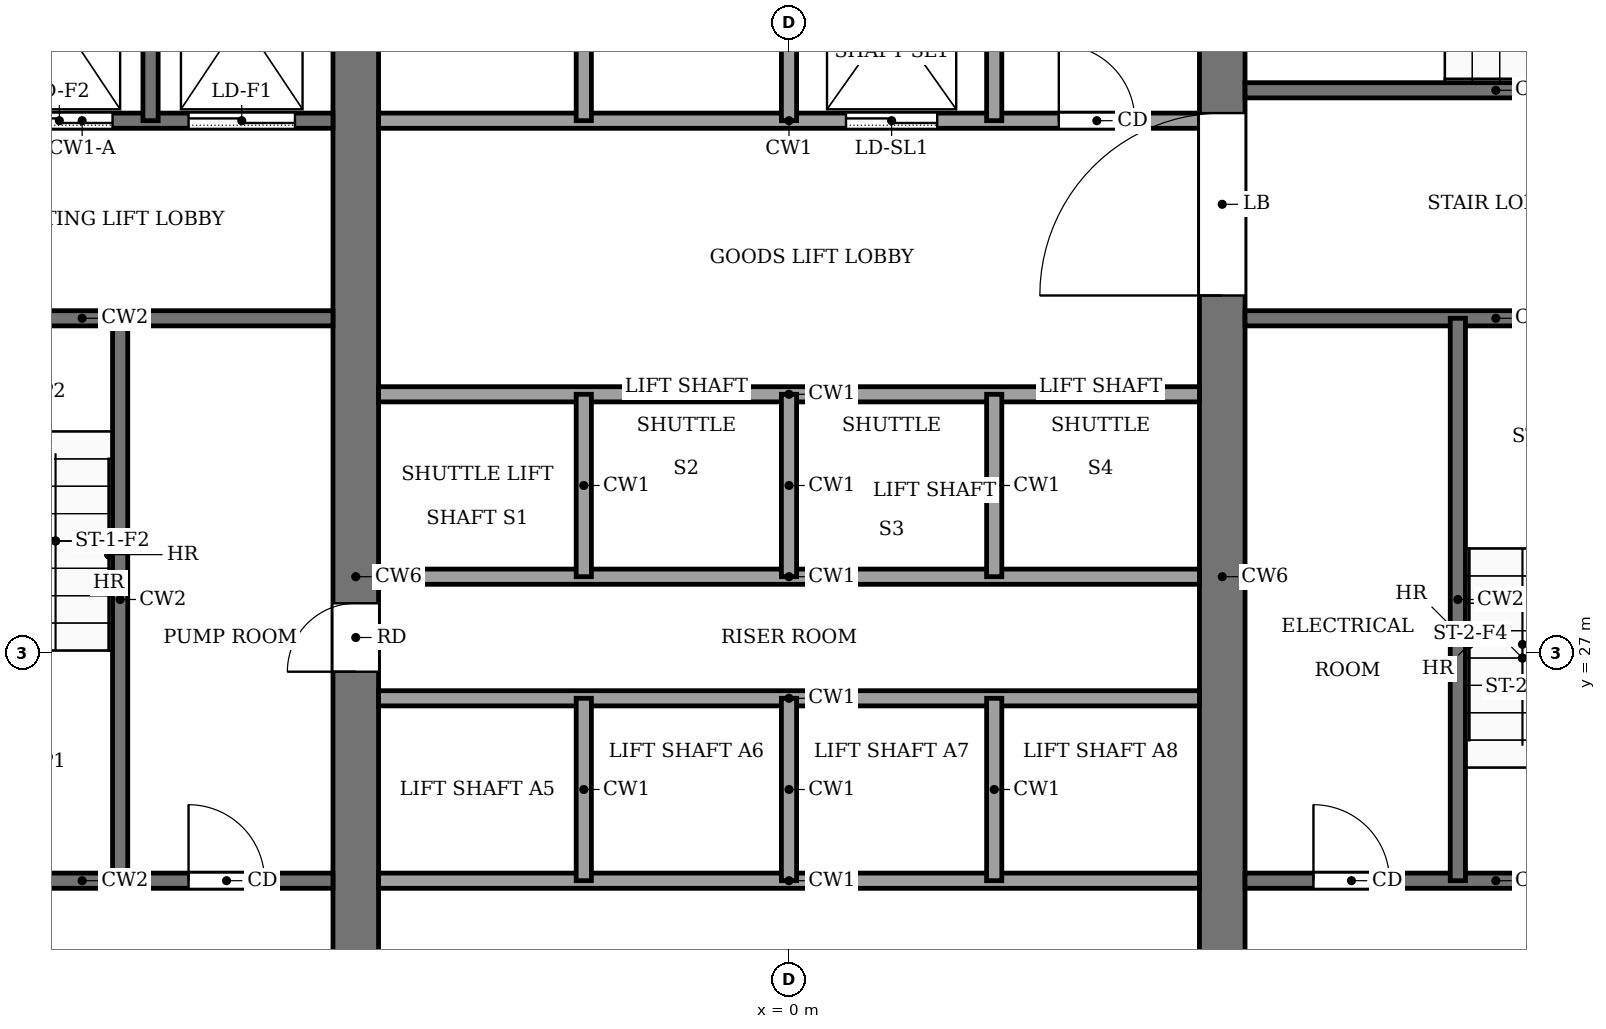
"""IFC4 building model, lengths in metres.
Left out: names, types, materials, properties, quantities, classifications, styles, units other than length and angle.
Written with IfcOpenShell. Run it as: python <this file> out.ifc"""

import sys

from ifc_helpers import new_model, si_unit, direction, frame, frame_2d, origin, place, context, subcontext, project, spatial, rectangle, extrude, element, fill, save


model = new_model("IFC4")
c1 = context("Model", 3, precision=1e-05, world=origin(), true_north=direction((0.0, 1.0)))
c2 = subcontext(c1, "Body", "Model", "MODEL_VIEW")
j1 = project(units=[si_unit("LENGTHUNIT", "METRE"), si_unit("PLANEANGLEUNIT", "RADIAN")], contexts=[c1])
p1 = place(None, origin())
s1 = spatial("IfcSite", under=j1, at=p1, CompositionType="ELEMENT")
p2 = place(p1, origin())
s2 = spatial("IfcBuilding", under=s1, at=p2, CompositionType="ELEMENT")
p3 = place(p2, frame((0.0, 0.0, -6.0)))
s3 = spatial("IfcBuildingStorey", under=s2, at=p3, CompositionType="ELEMENT", Elevation=-6.0)
p4 = place(p3, frame((-5.7, 18.4, 0.0), z_axis=(0.0, 0.0, 1.0), x_axis=(0.0, 1.0, 0.0)))
e1 = element("IfcWall", 1, at=p4, inside=s3, PredefinedType="SHEAR", context=c2, shape_type="SweptSolid", body=[
    extrude(rectangle(XDim=19.2, YDim=0.6, at=frame_2d((9.6, 0.0))), origin(), (0.0, 0.0, 1.0), 5.55),
])
p5 = place(p4, frame((8.35, 0.0, 0.0)))
e2 = element("IfcOpeningElement", 2, at=p5, cuts=e1, PredefinedType="OPENING", context=c2, shape_type="SweptSolid", body=[
    extrude(rectangle(XDim=0.9, YDim=2.1, at=frame_2d((0.45, 1.05))), frame((0.0, 0.31, 0.0), z_axis=(0.0, -1.0, 0.0), x_axis=(1.0, 0.0, 0.0)), (0.0, 0.0, 1.0), 0.62),
])
p6 = place(p3, frame((5.7, 18.4, 0.0), z_axis=(0.0, 0.0, 1.0), x_axis=(0.0, 1.0, 0.0)))
e3 = element("IfcWall", 3, at=p6, inside=s3, PredefinedType="SHEAR", context=c2, shape_type="SweptSolid", body=[
    extrude(rectangle(XDim=19.2, YDim=0.6, at=frame_2d((9.6, 0.0))), origin(), (0.0, 0.0, 1.0), 5.55),
])
p7 = place(p6, frame((13.3, 0.0, 0.0)))
e4 = element("IfcOpeningElement", 4, at=p7, cuts=e3, PredefinedType="OPENING", context=c2, shape_type="SweptSolid", body=[
    extrude(rectangle(XDim=2.4, YDim=2.4, at=frame_2d((1.2, 1.2))), frame((0.0, 0.31, 0.0), z_axis=(0.0, -1.0, 0.0), x_axis=(1.0, 0.0, 0.0)), (0.0, 0.0, 1.0), 0.62),
])
p8 = place(p3, frame((-12.6, 24.0, 0.0), z_axis=(0.0, 0.0, 1.0), x_axis=(1.0, 0.0, 0.0)))
e5 = element("IfcWall", 5, at=p8, inside=s3, PredefinedType="PARTITIONING", context=c2, shape_type="SweptSolid", body=[
    extrude(rectangle(XDim=6.6, YDim=0.2, at=frame_2d((3.3, 0.0))), origin(), (0.0, 0.0, 1.0), 5.55),
])
p9 = place(p8, frame((4.7, 0.0, 0.0)))
e6 = element("IfcOpeningElement", 6, at=p9, cuts=e5, PredefinedType="OPENING", context=c2, shape_type="SweptSolid", body=[
    extrude(rectangle(XDim=1.0, YDim=2.1, at=frame_2d((0.5, 1.05))), frame((0.0, 0.11, 0.0), z_axis=(0.0, -1.0, 0.0), x_axis=(1.0, 0.0, 0.0)), (0.0, 0.0, 1.0), 0.22),
])
p10 = place(p3, frame((-5.4, 24.0, 0.0), z_axis=(0.0, 0.0, 1.0), x_axis=(1.0, 0.0, 0.0)))
e7 = element("IfcWall", 7, at=p10, inside=s3, PredefinedType="PARTITIONING", context=c2, shape_type="SweptSolid", body=[
    extrude(rectangle(XDim=10.8, YDim=0.2, at=frame_2d((5.4, 0.0))), origin(), (0.0, 0.0, 1.0), 5.55),
])
p11 = place(p3, frame((6.0, 24.0, 0.0), z_axis=(0.0, 0.0, 1.0), x_axis=(1.0, 0.0, 0.0)))
e8 = element("IfcWall", 8, at=p11, inside=s3, PredefinedType="PARTITIONING", context=c2, shape_type="SweptSolid", body=[
    extrude(rectangle(XDim=6.6, YDim=0.2, at=frame_2d((3.3, 0.0))), origin(), (0.0, 0.0, 1.0), 5.55),
])
p12 = place(p11, frame((0.9, 0.0, 0.0)))
e9 = element("IfcOpeningElement", 9, at=p12, cuts=e8, PredefinedType="OPENING", context=c2, shape_type="SweptSolid", body=[
    extrude(rectangle(XDim=1.0, YDim=2.1, at=frame_2d((0.5, 1.05))), frame((0.0, 0.11, 0.0), z_axis=(0.0, -1.0, 0.0), x_axis=(1.0, 0.0, 0.0)), (0.0, 0.0, 1.0), 0.22),
])
p13 = place(p11, frame((4.4, 0.0, 0.0)))
e10 = element("IfcOpeningElement", 10, at=p13, cuts=e8, PredefinedType="OPENING", context=c2, shape_type="SweptSolid", body=[
    extrude(rectangle(XDim=1.2, YDim=2.2, at=frame_2d((0.6, 1.1))), frame((0.0, 0.11, 0.0), z_axis=(0.0, -1.0, 0.0), x_axis=(1.0, 0.0, 0.0)), (0.0, 0.0, 1.0), 0.22),
])
for number, where, z_axis, x_axis in (
    (11, (-5.4, 26.4, 0.0), (0.0, 0.0, 1.0), (1.0, 0.0, 0.0)),
    (12, (-5.4, 28.0, 0.0), (0.0, 0.0, 1.0), (1.0, 0.0, 0.0)),
    (13, (-5.4, 30.4, 0.0), (0.0, 0.0, 1.0), (1.0, 0.0, 0.0)),
):
    element("IfcWall", number, at=place(p3, frame(where, z_axis=z_axis, x_axis=x_axis)), inside=s3, PredefinedType="PARTITIONING", context=c2, shape_type="SweptSolid", body=[
        extrude(rectangle(XDim=10.8, YDim=0.2, at=frame_2d((5.4, 0.0))), origin(), (0.0, 0.0, 1.0), 5.55),
    ])
p14 = place(p3, frame((-12.6, 31.4, 0.0), z_axis=(0.0, 0.0, 1.0), x_axis=(1.0, 0.0, 0.0)))
e14 = element("IfcWall", 14, at=p14, inside=s3, PredefinedType="PARTITIONING", context=c2, shape_type="SweptSolid", body=[
    extrude(rectangle(XDim=6.6, YDim=0.2, at=frame_2d((3.3, 0.0))), origin(), (0.0, 0.0, 1.0), 5.55),
])
p15 = place(p14, frame((1.0, 0.0, 0.0)))
e15 = element("IfcOpeningElement", 15, at=p15, cuts=e14, PredefinedType="OPENING", context=c2, shape_type="SweptSolid", body=[
    extrude(rectangle(XDim=1.2, YDim=2.2, at=frame_2d((0.6, 1.1))), frame((0.0, 0.11, 0.0), z_axis=(0.0, -1.0, 0.0), x_axis=(1.0, 0.0, 0.0)), (0.0, 0.0, 1.0), 0.22),
])
p16 = place(p3, frame((6.0, 31.4, 0.0), z_axis=(0.0, 0.0, 1.0), x_axis=(1.0, 0.0, 0.0)))
e16 = element("IfcWall", 16, at=p16, inside=s3, PredefinedType="PARTITIONING", context=c2, shape_type="SweptSolid", body=[
    extrude(rectangle(XDim=6.6, YDim=0.2, at=frame_2d((3.3, 0.0))), origin(), (0.0, 0.0, 1.0), 5.55),
])
p17 = place(p3, frame((-12.6, 34.0, 0.0), z_axis=(0.0, 0.0, 1.0), x_axis=(1.0, 0.0, 0.0)))
e17 = element("IfcWall", 17, at=p17, inside=s3, PredefinedType="PARTITIONING", context=c2, shape_type="SweptSolid", body=[
    extrude(rectangle(XDim=6.6, YDim=0.2, at=frame_2d((3.3, 0.0))), origin(), (0.0, 0.0, 1.0), 5.55),
])
p18 = place(p17, frame((4.7, 0.0, 0.0)))
e18 = element("IfcOpeningElement", 18, at=p18, cuts=e17, PredefinedType="OPENING", context=c2, shape_type="SweptSolid", body=[
    extrude(rectangle(XDim=1.4, YDim=2.2, at=frame_2d((0.7, 1.1))), frame((0.0, 0.11, 0.0), z_axis=(0.0, -1.0, 0.0), x_axis=(1.0, 0.0, 0.0)), (0.0, 0.0, 1.0), 0.22),
])
p19 = place(p17, frame((2.3, 0.0, 0.0)))
e19 = element("IfcOpeningElement", 19, at=p19, cuts=e17, PredefinedType="OPENING", context=c2, shape_type="SweptSolid", body=[
    extrude(rectangle(XDim=1.4, YDim=2.2, at=frame_2d((0.7, 1.1))), frame((0.0, 0.11, 0.0), z_axis=(0.0, -1.0, 0.0), x_axis=(1.0, 0.0, 0.0)), (0.0, 0.0, 1.0), 0.22),
])
p20 = place(p17, frame((0.45, 0.0, 0.0)))
e20 = element("IfcOpeningElement", 20, at=p20, cuts=e17, PredefinedType="OPENING", context=c2, shape_type="SweptSolid", body=[
    extrude(rectangle(XDim=0.9, YDim=2.1, at=frame_2d((0.45, 1.05))), frame((0.0, 0.11, 0.0), z_axis=(0.0, -1.0, 0.0), x_axis=(1.0, 0.0, 0.0)), (0.0, 0.0, 1.0), 0.22),
])
p21 = place(p3, frame((-5.4, 34.0, 0.0), z_axis=(0.0, 0.0, 1.0), x_axis=(1.0, 0.0, 0.0)))
e21 = element("IfcWall", 21, at=p21, inside=s3, PredefinedType="PARTITIONING", context=c2, shape_type="SweptSolid", body=[
    extrude(rectangle(XDim=10.8, YDim=0.2, at=frame_2d((5.4, 0.0))), origin(), (0.0, 0.0, 1.0), 5.55),
])
p22 = place(p21, frame((6.15, 0.0, 0.0)))
e22 = element("IfcOpeningElement", 22, at=p22, cuts=e21, PredefinedType="OPENING", context=c2, shape_type="SweptSolid", body=[
    extrude(rectangle(XDim=1.2, YDim=2.2, at=frame_2d((0.6, 1.1))), frame((0.0, 0.11, 0.0), z_axis=(0.0, -1.0, 0.0), x_axis=(1.0, 0.0, 0.0)), (0.0, 0.0, 1.0), 0.22),
])
p23 = place(p21, frame((8.95, 0.0, 0.0)))
e23 = element("IfcOpeningElement", 23, at=p23, cuts=e21, PredefinedType="OPENING", context=c2, shape_type="SweptSolid", body=[
    extrude(rectangle(XDim=1.0, YDim=2.1, at=frame_2d((0.5, 1.05))), frame((0.0, 0.11, 0.0), z_axis=(0.0, -1.0, 0.0), x_axis=(1.0, 0.0, 0.0)), (0.0, 0.0, 1.0), 0.22),
])
p24 = place(p3, frame((6.0, 34.4, 0.0), z_axis=(0.0, 0.0, 1.0), x_axis=(1.0, 0.0, 0.0)))
e24 = element("IfcWall", 24, at=p24, inside=s3, PredefinedType="PARTITIONING", context=c2, shape_type="SweptSolid", body=[
    extrude(rectangle(XDim=6.6, YDim=0.2, at=frame_2d((3.3, 0.0))), origin(), (0.0, 0.0, 1.0), 5.55),
])
p25 = place(p24, frame((4.8, 0.0, 0.0)))
e25 = element("IfcOpeningElement", 25, at=p25, cuts=e24, PredefinedType="OPENING", context=c2, shape_type="SweptSolid", body=[
    extrude(rectangle(XDim=1.2, YDim=2.2, at=frame_2d((0.6, 1.1))), frame((0.0, 0.11, 0.0), z_axis=(0.0, -1.0, 0.0), x_axis=(1.0, 0.0, 0.0)), (0.0, 0.0, 1.0), 0.22),
])
p26 = place(p3, frame((-8.8, 24.0, 0.0), z_axis=(0.0, 0.0, 1.0), x_axis=(0.0, 1.0, 0.0)))
e26 = element("IfcWall", 26, at=p26, inside=s3, PredefinedType="PARTITIONING", context=c2, shape_type="SweptSolid", body=[
    extrude(rectangle(XDim=7.4, YDim=0.2, at=frame_2d((3.7, 0.0))), origin(), (0.0, 0.0, 1.0), 5.55),
])
p27 = place(p3, frame((-8.4, 34.0, 0.0), z_axis=(0.0, 0.0, 1.0), x_axis=(0.0, 1.0, 0.0)))
e27 = element("IfcWall", 27, at=p27, inside=s3, PredefinedType="PARTITIONING", context=c2, shape_type="SweptSolid", body=[
    extrude(rectangle(XDim=3.6, YDim=0.2, at=frame_2d((1.8, 0.0))), origin(), (0.0, 0.0, 1.0), 5.55),
])
for number, where, z_axis, x_axis in (
    (28, (-2.7, 24.0, 0.0), (0.0, 0.0, 1.0), (0.0, 1.0, 0.0)),
    (29, (-2.7, 28.0, 0.0), (0.0, 0.0, 1.0), (0.0, 1.0, 0.0)),
):
    element("IfcWall", number, at=place(p3, frame(where, z_axis=z_axis, x_axis=x_axis)), inside=s3, PredefinedType="PARTITIONING", context=c2, shape_type="SweptSolid", body=[
        extrude(rectangle(XDim=2.4, YDim=0.2, at=frame_2d((1.2, 0.0))), origin(), (0.0, 0.0, 1.0), 5.55),
    ])
p28 = place(p3, frame((-2.7, 34.0, 0.0), z_axis=(0.0, 0.0, 1.0), x_axis=(0.0, 1.0, 0.0)))
e30 = element("IfcWall", 30, at=p28, inside=s3, PredefinedType="PARTITIONING", context=c2, shape_type="SweptSolid", body=[
    extrude(rectangle(XDim=3.6, YDim=0.2, at=frame_2d((1.8, 0.0))), origin(), (0.0, 0.0, 1.0), 5.55),
])
for number, where, z_axis, x_axis in (
    (31, (0.0, 24.0, 0.0), (0.0, 0.0, 1.0), (0.0, 1.0, 0.0)),
    (32, (0.0, 28.0, 0.0), (0.0, 0.0, 1.0), (0.0, 1.0, 0.0)),
):
    element("IfcWall", number, at=place(p3, frame(where, z_axis=z_axis, x_axis=x_axis)), inside=s3, PredefinedType="PARTITIONING", context=c2, shape_type="SweptSolid", body=[
        extrude(rectangle(XDim=2.4, YDim=0.2, at=frame_2d((1.2, 0.0))), origin(), (0.0, 0.0, 1.0), 5.55),
    ])
p29 = place(p3, frame((0.0, 34.0, 0.0), z_axis=(0.0, 0.0, 1.0), x_axis=(0.0, 1.0, 0.0)))
e33 = element("IfcWall", 33, at=p29, inside=s3, PredefinedType="PARTITIONING", context=c2, shape_type="SweptSolid", body=[
    extrude(rectangle(XDim=3.6, YDim=0.2, at=frame_2d((1.8, 0.0))), origin(), (0.0, 0.0, 1.0), 5.55),
])
for number, where, z_axis, x_axis in (
    (34, (2.7, 24.0, 0.0), (0.0, 0.0, 1.0), (0.0, 1.0, 0.0)),
    (35, (2.7, 28.0, 0.0), (0.0, 0.0, 1.0), (0.0, 1.0, 0.0)),
):
    element("IfcWall", number, at=place(p3, frame(where, z_axis=z_axis, x_axis=x_axis)), inside=s3, PredefinedType="PARTITIONING", context=c2, shape_type="SweptSolid", body=[
        extrude(rectangle(XDim=2.4, YDim=0.2, at=frame_2d((1.2, 0.0))), origin(), (0.0, 0.0, 1.0), 5.55),
    ])
p30 = place(p3, frame((2.7, 34.0, 0.0), z_axis=(0.0, 0.0, 1.0), x_axis=(0.0, 1.0, 0.0)))
e36 = element("IfcWall", 36, at=p30, inside=s3, PredefinedType="PARTITIONING", context=c2, shape_type="SweptSolid", body=[
    extrude(rectangle(XDim=3.6, YDim=0.2, at=frame_2d((1.8, 0.0))), origin(), (0.0, 0.0, 1.0), 5.55),
])
p31 = place(p3, frame((8.8, 24.0, 0.0), z_axis=(0.0, 0.0, 1.0), x_axis=(0.0, 1.0, 0.0)))
e37 = element("IfcWall", 37, at=p31, inside=s3, PredefinedType="PARTITIONING", context=c2, shape_type="SweptSolid", body=[
    extrude(rectangle(XDim=7.4, YDim=0.2, at=frame_2d((3.7, 0.0))), origin(), (0.0, 0.0, 1.0), 5.55),
])
p32 = place(p22, origin())
e38 = element("IfcDoor", 38, at=p32, inside=s3, OperationType="SLIDING_TO_LEFT", PredefinedType="DOOR", context=c2, shape_type="SweptSolid", body=[
    extrude(rectangle(XDim=1.2, YDim=2.2, at=frame_2d((0.6, 1.1))), frame((0.0, 0.025, 0.0), z_axis=(0.0, -1.0, 0.0), x_axis=(1.0, 0.0, 0.0)), (0.0, 0.0, 1.0), 0.05),
])
fill(e22, e38)
p33 = place(p18, origin())
e39 = element("IfcDoor", 39, at=p33, inside=s3, OperationType="SLIDING_TO_LEFT", PredefinedType="DOOR", context=c2, shape_type="SweptSolid", body=[
    extrude(rectangle(XDim=1.4, YDim=2.2, at=frame_2d((0.7, 1.1))), frame((0.0, 0.025, 0.0), z_axis=(0.0, -1.0, 0.0), x_axis=(1.0, 0.0, 0.0)), (0.0, 0.0, 1.0), 0.05),
])
fill(e18, e39)
p34 = place(p19, origin())
e40 = element("IfcDoor", 40, at=p34, inside=s3, OperationType="SLIDING_TO_LEFT", PredefinedType="DOOR", context=c2, shape_type="SweptSolid", body=[
    extrude(rectangle(XDim=1.4, YDim=2.2, at=frame_2d((0.7, 1.1))), frame((0.0, 0.025, 0.0), z_axis=(0.0, -1.0, 0.0), x_axis=(1.0, 0.0, 0.0)), (0.0, 0.0, 1.0), 0.05),
])
fill(e19, e40)
p35 = place(p9, origin())
e41 = element("IfcDoor", 41, at=p35, inside=s3, OperationType="SINGLE_SWING_RIGHT", PredefinedType="DOOR", context=c2, shape_type="SweptSolid", body=[
    extrude(rectangle(XDim=1.0, YDim=2.1, at=frame_2d((0.5, 1.05))), frame((0.0, 0.025, 0.0), z_axis=(0.0, -1.0, 0.0), x_axis=(1.0, 0.0, 0.0)), (0.0, 0.0, 1.0), 0.05),
])
fill(e6, e41)
p36 = place(p12, origin())
e42 = element("IfcDoor", 42, at=p36, inside=s3, OperationType="SINGLE_SWING_LEFT", PredefinedType="DOOR", context=c2, shape_type="SweptSolid", body=[
    extrude(rectangle(XDim=1.0, YDim=2.1, at=frame_2d((0.5, 1.05))), frame((0.0, 0.025, 0.0), z_axis=(0.0, -1.0, 0.0), x_axis=(1.0, 0.0, 0.0)), (0.0, 0.0, 1.0), 0.05),
])
fill(e9, e42)
p37 = place(p23, origin())
e43 = element("IfcDoor", 43, at=p37, inside=s3, OperationType="SINGLE_SWING_LEFT", PredefinedType="DOOR", context=c2, shape_type="SweptSolid", body=[
    extrude(rectangle(XDim=1.0, YDim=2.1, at=frame_2d((0.5, 1.05))), frame((0.0, 0.025, 0.0), z_axis=(0.0, -1.0, 0.0), x_axis=(1.0, 0.0, 0.0)), (0.0, 0.0, 1.0), 0.05),
])
fill(e23, e43)
p38 = place(p5, origin())
e44 = element("IfcDoor", 44, at=p38, inside=s3, OperationType="SINGLE_SWING_RIGHT", PredefinedType="DOOR", context=c2, shape_type="SweptSolid", body=[
    extrude(rectangle(XDim=0.9, YDim=2.1, at=frame_2d((0.45, 1.05))), frame((0.0, 0.025, 0.0), z_axis=(0.0, -1.0, 0.0), x_axis=(1.0, 0.0, 0.0)), (0.0, 0.0, 1.0), 0.05),
])
fill(e2, e44)
p39 = place(p7, origin())
e45 = element("IfcDoor", 45, at=p39, inside=s3, OperationType="DOUBLE_DOOR_SINGLE_SWING", PredefinedType="DOOR", context=c2, shape_type="SweptSolid", body=[
    extrude(rectangle(XDim=2.4, YDim=2.4, at=frame_2d((1.2, 1.2))), frame((0.0, 0.025, 0.0), z_axis=(0.0, -1.0, 0.0), x_axis=(1.0, 0.0, 0.0)), (0.0, 0.0, 1.0), 0.05),
])
fill(e4, e45)
save(model, sys.argv[1])
